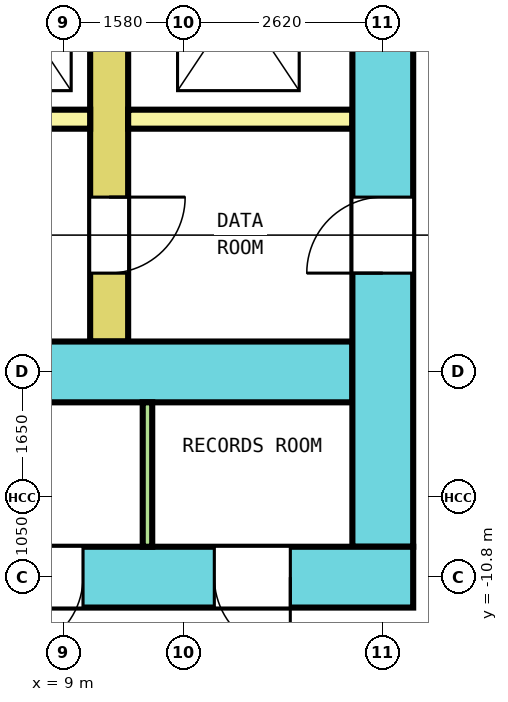
"""IFC4 building model, lengths in metres.
Left out: names, types, materials, properties, quantities, classifications, styles, units other than length and angle.
Written with IfcOpenShell. Run it as: python <this file> out.ifc"""

import sys

from ifc_helpers import new_model, si_unit, direction, frame, frame_2d, origin, place, context, subcontext, project, spatial, rectangle, extrude, element, fill, save


model = new_model("IFC4")
c1 = context("Model", 3, precision=1e-05, world=origin(), true_north=direction((0.0, 1.0)))
c2 = subcontext(c1, "Body", "Model", "MODEL_VIEW")
j1 = project(units=[si_unit("LENGTHUNIT", "METRE"), si_unit("PLANEANGLEUNIT", "RADIAN")], contexts=[c1])
p1 = place(None, origin())
s1 = spatial("IfcSite", under=j1, at=p1, CompositionType="ELEMENT")
p2 = place(p1, origin())
s2 = spatial("IfcBuilding", under=s1, at=p2, CompositionType="ELEMENT")
p3 = place(p2, frame((0.0, 0.0, 94.0)))
s3 = spatial("IfcBuildingStorey", under=s2, at=p3, CompositionType="ELEMENT", Elevation=94.0)
p4 = place(p3, frame((-13.6, -10.8, 0.0), z_axis=(0.0, 0.0, 1.0), x_axis=(1.0, 0.0, 0.0)))
e1 = element("IfcWall", 1, at=p4, inside=s3, PredefinedType="SHEAR", context=c2, shape_type="SweptSolid", body=[
    extrude(rectangle(XDim=27.2, YDim=0.8, at=frame_2d((13.6, 0.0))), origin(), (0.0, 0.0, 1.0), 4.1),
])
p5 = place(p4, frame((2.333, 0.0, 0.0)))
e2 = element("IfcOpeningElement", 2, at=p5, cuts=e1, PredefinedType="OPENING", context=c2, shape_type="SweptSolid", body=[
    extrude(rectangle(XDim=1.0, YDim=2.1, at=frame_2d((0.5, 1.05))), frame((0.0, 0.41, 0.0), z_axis=(0.0, -1.0, 0.0), x_axis=(1.0, 0.0, 0.0)), (0.0, 0.0, 1.0), 0.82),
])
p6 = place(p4, frame((6.494, 0.0, 0.0)))
e3 = element("IfcOpeningElement", 3, at=p6, cuts=e1, PredefinedType="OPENING", context=c2, shape_type="SweptSolid", body=[
    extrude(rectangle(XDim=1.0, YDim=2.1, at=frame_2d((0.5, 1.05))), frame((0.0, 0.41, 0.0), z_axis=(0.0, -1.0, 0.0), x_axis=(1.0, 0.0, 0.0)), (0.0, 0.0, 1.0), 0.82),
])
p7 = place(p4, frame((10.623, 0.0, 0.0)))
e4 = element("IfcOpeningElement", 4, at=p7, cuts=e1, PredefinedType="OPENING", context=c2, shape_type="SweptSolid", body=[
    extrude(rectangle(XDim=1.0, YDim=2.1, at=frame_2d((0.5, 1.05))), frame((0.0, 0.41, 0.0), z_axis=(0.0, -1.0, 0.0), x_axis=(1.0, 0.0, 0.0)), (0.0, 0.0, 1.0), 0.82),
])
p8 = place(p4, frame((19.16, 0.0, 0.0)))
e5 = element("IfcOpeningElement", 5, at=p8, cuts=e1, PredefinedType="OPENING", context=c2, shape_type="SweptSolid", body=[
    extrude(rectangle(XDim=1.0, YDim=2.1, at=frame_2d((0.5, 1.05))), frame((0.0, 0.41, 0.0), z_axis=(0.0, -1.0, 0.0), x_axis=(1.0, 0.0, 0.0)), (0.0, 0.0, 1.0), 0.82),
])
p9 = place(p4, frame((21.856, 0.0, 0.0)))
e6 = element("IfcOpeningElement", 6, at=p9, cuts=e1, PredefinedType="OPENING", context=c2, shape_type="SweptSolid", body=[
    extrude(rectangle(XDim=1.0, YDim=2.1, at=frame_2d((0.5, 1.05))), frame((0.0, 0.41, 0.0), z_axis=(0.0, -1.0, 0.0), x_axis=(1.0, 0.0, 0.0)), (0.0, 0.0, 1.0), 0.82),
])
p10 = place(p4, frame((24.583, 0.0, 0.0)))
e7 = element("IfcOpeningElement", 7, at=p10, cuts=e1, PredefinedType="OPENING", context=c2, shape_type="SweptSolid", body=[
    extrude(rectangle(XDim=1.0, YDim=2.1, at=frame_2d((0.5, 1.05))), frame((0.0, 0.41, 0.0), z_axis=(0.0, -1.0, 0.0), x_axis=(1.0, 0.0, 0.0)), (0.0, 0.0, 1.0), 0.82),
])
p11 = place(p4, frame((15.15, 0.0, 0.0)))
e8 = element("IfcOpeningElement", 8, at=p11, cuts=e1, PredefinedType="OPENING", context=c2, shape_type="SweptSolid", body=[
    extrude(rectangle(XDim=1.2, YDim=2.1, at=frame_2d((0.6, 1.05))), frame((0.0, 0.41, 0.0), z_axis=(0.0, -1.0, 0.0), x_axis=(1.0, 0.0, 0.0)), (0.0, 0.0, 1.0), 0.82),
])
p12 = place(p3, frame((13.2, -10.4, 0.0), z_axis=(0.0, 0.0, 1.0), x_axis=(0.0, 1.0, 0.0)))
e9 = element("IfcWall", 9, at=p12, inside=s3, PredefinedType="SHEAR", context=c2, shape_type="SweptSolid", body=[
    extrude(rectangle(XDim=20.8, YDim=0.8, at=frame_2d((10.4, 0.0))), origin(), (0.0, 0.0, 1.0), 4.1),
])
p13 = place(p12, frame((9.2, 0.0, 0.0)))
e10 = element("IfcOpeningElement", 10, at=p13, cuts=e9, PredefinedType="OPENING", context=c2, shape_type="SweptSolid", body=[
    extrude(rectangle(XDim=2.4, YDim=2.1, at=frame_2d((1.2, 1.05))), frame((0.0, 0.41, 0.0), z_axis=(0.0, -1.0, 0.0), x_axis=(1.0, 0.0, 0.0)), (0.0, 0.0, 1.0), 0.82),
])
p14 = place(p12, frame((16.1, 0.0, 0.0)))
e11 = element("IfcOpeningElement", 11, at=p14, cuts=e9, PredefinedType="OPENING", context=c2, shape_type="SweptSolid", body=[
    extrude(rectangle(XDim=1.2, YDim=2.1, at=frame_2d((0.6, 1.05))), frame((0.0, 0.41, 0.0), z_axis=(0.0, -1.0, 0.0), x_axis=(1.0, 0.0, 0.0)), (0.0, 0.0, 1.0), 0.82),
])
p15 = place(p12, frame((3.6, 0.0, 0.0)))
e12 = element("IfcOpeningElement", 12, at=p15, cuts=e9, PredefinedType="OPENING", context=c2, shape_type="SweptSolid", body=[
    extrude(rectangle(XDim=1.0, YDim=2.1, at=frame_2d((0.5, 1.05))), frame((0.0, 0.41, 0.0), z_axis=(0.0, -1.0, 0.0), x_axis=(1.0, 0.0, 0.0)), (0.0, 0.0, 1.0), 0.82),
])
p16 = place(p3, frame((-12.8, -8.1, 0.0), z_axis=(0.0, 0.0, 1.0), x_axis=(1.0, 0.0, 0.0)))
e13 = element("IfcWall", 13, at=p16, inside=s3, PredefinedType="SHEAR", context=c2, shape_type="SweptSolid", body=[
    extrude(rectangle(XDim=25.6, YDim=0.8, at=frame_2d((12.8, 0.0))), origin(), (0.0, 0.0, 1.0), 4.1),
])
p17 = place(p16, frame((14.35, 0.0, 0.0)))
e14 = element("IfcOpeningElement", 14, at=p17, cuts=e13, PredefinedType="OPENING", context=c2, shape_type="SweptSolid", body=[
    extrude(rectangle(XDim=1.2, YDim=2.1, at=frame_2d((0.6, 1.05))), frame((0.0, 0.41, 0.0), z_axis=(0.0, -1.0, 0.0), x_axis=(1.0, 0.0, 0.0)), (0.0, 0.0, 1.0), 0.82),
])
p18 = place(p3, frame((9.6, -7.7, 0.0), z_axis=(0.0, 0.0, 1.0), x_axis=(0.0, 1.0, 0.0)))
e15 = element("IfcWall", 15, at=p18, inside=s3, PredefinedType="SHEAR", context=c2, shape_type="SweptSolid", body=[
    extrude(rectangle(XDim=15.4, YDim=0.5, at=frame_2d((7.7, 0.0))), origin(), (0.0, 0.0, 1.0), 4.1),
])
p19 = place(p18, frame((6.5, 0.0, 0.0)))
e16 = element("IfcOpeningElement", 16, at=p19, cuts=e15, PredefinedType="OPENING", context=c2, shape_type="SweptSolid", body=[
    extrude(rectangle(XDim=2.4, YDim=2.1, at=frame_2d((1.2, 1.05))), frame((0.0, 0.26, 0.0), z_axis=(0.0, -1.0, 0.0), x_axis=(1.0, 0.0, 0.0)), (0.0, 0.0, 1.0), 0.52),
])
p20 = place(p18, frame((13.4, 0.0, 0.0)))
e17 = element("IfcOpeningElement", 17, at=p20, cuts=e15, PredefinedType="OPENING", context=c2, shape_type="SweptSolid", body=[
    extrude(rectangle(XDim=1.2, YDim=2.1, at=frame_2d((0.6, 1.05))), frame((0.0, 0.26, 0.0), z_axis=(0.0, -1.0, 0.0), x_axis=(1.0, 0.0, 0.0)), (0.0, 0.0, 1.0), 0.52),
])
p21 = place(p18, frame((0.9, 0.0, 0.0)))
e18 = element("IfcOpeningElement", 18, at=p21, cuts=e15, PredefinedType="OPENING", context=c2, shape_type="SweptSolid", body=[
    extrude(rectangle(XDim=1.0, YDim=2.1, at=frame_2d((0.5, 1.05))), frame((0.0, 0.26, 0.0), z_axis=(0.0, -1.0, 0.0), x_axis=(1.0, 0.0, 0.0)), (0.0, 0.0, 1.0), 0.52),
])
p22 = place(p3, frame((-9.35, -4.775, 0.0), z_axis=(0.0, 0.0, 1.0), x_axis=(1.0, 0.0, 0.0)))
e19 = element("IfcWall", 19, at=p22, inside=s3, PredefinedType="SOLIDWALL", context=c2, shape_type="SweptSolid", body=[
    extrude(rectangle(XDim=18.7, YDim=0.25, at=frame_2d((9.35, 0.0))), origin(), (0.0, 0.0, 1.0), 4.1),
])
p23 = place(p3, frame((9.85, -4.775, 0.0), z_axis=(0.0, 0.0, 1.0), x_axis=(1.0, 0.0, 0.0)))
e20 = element("IfcWall", 20, at=p23, inside=s3, PredefinedType="SOLIDWALL", context=c2, shape_type="SweptSolid", body=[
    extrude(rectangle(XDim=2.95, YDim=0.25, at=frame_2d((1.475, 0.0))), origin(), (0.0, 0.0, 1.0), 4.1),
])
p24 = place(p3, frame((10.104, -10.4, 0.0), z_axis=(0.0, 0.0, 1.0), x_axis=(0.0, 1.0, 0.0)))
e21 = element("IfcWall", 21, at=p24, inside=s3, PredefinedType="PARTITIONING", context=c2, shape_type="SweptSolid", body=[
    extrude(rectangle(XDim=1.9, YDim=0.125, at=frame_2d((0.95, 0.0))), origin(), (0.0, 0.0, 1.0), 4.1),
])
p25 = place(p21, origin())
e22 = element("IfcDoor", 22, at=p25, inside=s3, OperationType="SINGLE_SWING_LEFT", PredefinedType="DOOR", context=c2, shape_type="SweptSolid", body=[
    extrude(rectangle(XDim=1.0, YDim=2.1, at=frame_2d((0.5, 1.05))), frame((0.0, 0.2, 0.0), z_axis=(0.0, -1.0, 0.0), x_axis=(1.0, 0.0, 0.0)), (0.0, 0.0, 1.0), 0.4),
])
fill(e18, e22)
p26 = place(p15, origin())
e23 = element("IfcDoor", 23, at=p26, inside=s3, OperationType="SINGLE_SWING_RIGHT", PredefinedType="DOOR", context=c2, shape_type="SweptSolid", body=[
    extrude(rectangle(XDim=1.0, YDim=2.1, at=frame_2d((0.5, 1.05))), frame((0.0, 0.3, 0.0), z_axis=(0.0, -1.0, 0.0), x_axis=(1.0, 0.0, 0.0)), (0.0, 0.0, 1.0), 0.6),
])
fill(e12, e23)
p27 = place(p9, origin())
e24 = element("IfcDoor", 24, at=p27, inside=s3, OperationType="SINGLE_SWING_LEFT", PredefinedType="DOOR", context=c2, shape_type="SweptSolid", body=[
    extrude(rectangle(XDim=1.0, YDim=2.1, at=frame_2d((0.5, 1.05))), frame((0.0, 0.3, 0.0), z_axis=(0.0, -1.0, 0.0), x_axis=(1.0, 0.0, 0.0)), (0.0, 0.0, 1.0), 0.6),
])
fill(e6, e24)
p28 = place(p10, origin())
e25 = element("IfcDoor", 25, at=p28, inside=s3, OperationType="SINGLE_SWING_RIGHT", PredefinedType="DOOR", context=c2, shape_type="SweptSolid", body=[
    extrude(rectangle(XDim=1.0, YDim=2.1, at=frame_2d((0.5, 1.05))), frame((0.0, 0.3, 0.0), z_axis=(0.0, -1.0, 0.0), x_axis=(1.0, 0.0, 0.0)), (0.0, 0.0, 1.0), 0.6),
])
fill(e7, e25)
save(model, sys.argv[1])
